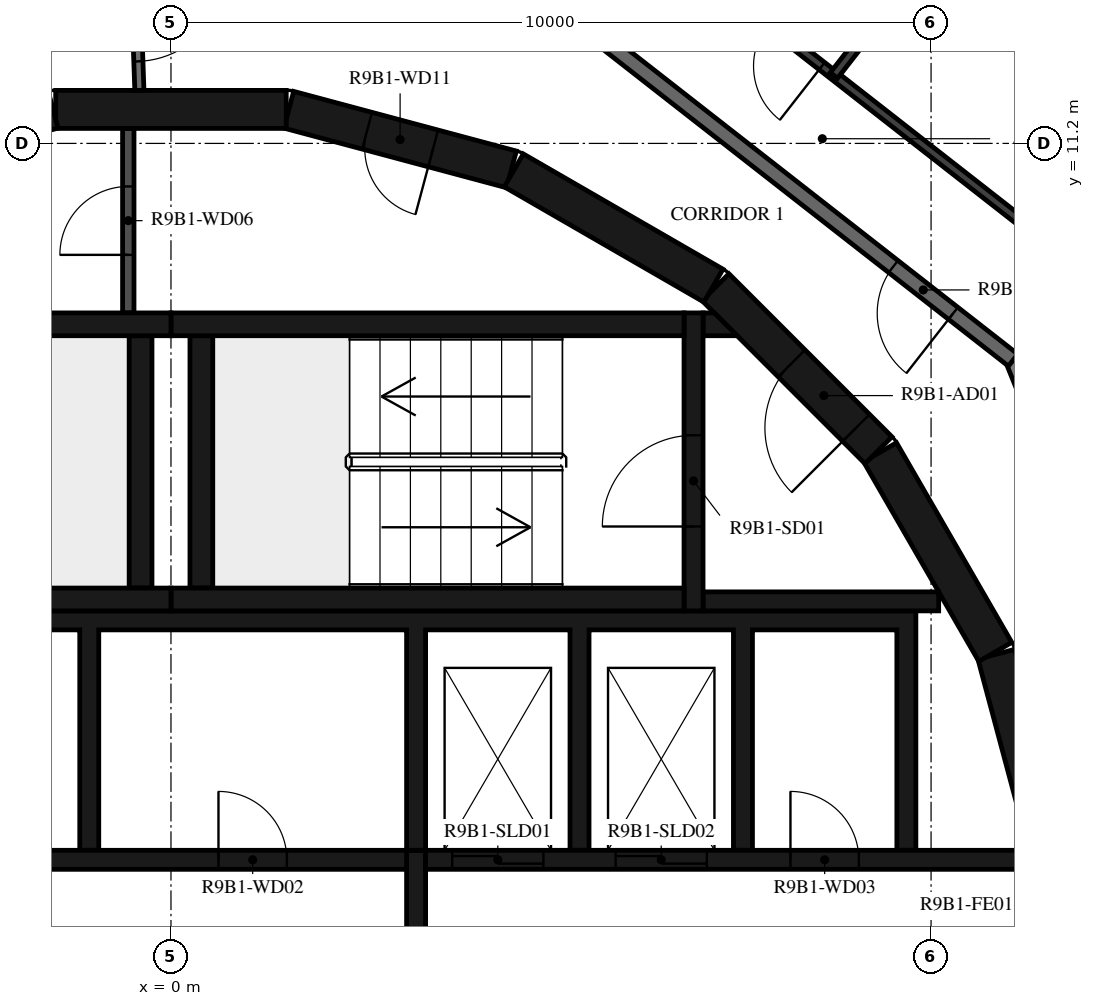
"""IFC4 building model, lengths in metres.
Left out: names, types, materials, properties, quantities, classifications, styles, units other than length and angle.
Written with IfcOpenShell. Run it as: python <this file> out.ifc"""

import sys

from ifc_helpers import new_model, si_unit, direction, frame, frame_2d, origin, place, context, subcontext, project, spatial, polyline, rectangle, outline, extrude, element, fill, save


model = new_model("IFC4")
c1 = context("Model", 3, precision=1e-05, world=origin(), true_north=direction((0.0, 1.0)))
c2 = subcontext(c1, "Body", "Model", "MODEL_VIEW")
j1 = project(units=[si_unit("LENGTHUNIT", "METRE"), si_unit("PLANEANGLEUNIT", "RADIAN")], contexts=[c1])
p1 = place(None, origin())
s1 = spatial("IfcSite", under=j1, at=p1, CompositionType="ELEMENT")
p2 = place(p1, origin())
s2 = spatial("IfcBuilding", under=s1, at=p2, CompositionType="ELEMENT")
p3 = place(p2, frame((0.0, 0.0, 343.5)))
s3 = spatial("IfcBuildingStorey", under=s2, at=p3, CompositionType="ELEMENT", Elevation=343.5)
for number, where, z_axis, x_axis in (
    (1, (11.643, 1.55, 0.0), (0.0, 0.0, 1.0), (-0.259, 0.966, 0.0)),
    (2, (10.845, 4.51, 0.0), (0.0, 0.0, 1.0), (-0.5, 0.866, 0.0)),
):
    element("IfcWall", number, at=place(p3, frame(where, z_axis=z_axis, x_axis=x_axis)), inside=s3, PredefinedType="SHEAR", context=c2, shape_type="SweptSolid", body=[
        extrude(rectangle(XDim=3.033, YDim=0.5, at=frame_2d((1.516, 0.0))), origin(), (0.0, 0.0, 1.0), 3.12),
    ])
p4 = place(p3, frame((9.308, 7.164, 0.0), z_axis=(0.0, 0.0, 1.0), x_axis=(-0.707106781187, 0.707106781187, 0.0)))
e3 = element("IfcWall", 3, at=p4, inside=s3, PredefinedType="SHEAR", context=c2, shape_type="SweptSolid", body=[
    extrude(rectangle(XDim=3.032, YDim=0.5, at=frame_2d((1.516, 0.0))), origin(), (0.0, 0.0, 1.0), 3.12),
])
p5 = place(p4, frame((0.416, 0.0, 0.0)))
e4 = element("IfcOpeningElement", 4, at=p5, cuts=e3, PredefinedType="OPENING", context=c2, shape_type="SweptSolid", body=[
    extrude(rectangle(XDim=1.2, YDim=2.1, at=frame_2d((0.6, 1.05))), frame((0.0, 0.26, 0.0), z_axis=(0.0, -1.0, 0.0), x_axis=(1.0, 0.0, 0.0)), (0.0, 0.0, 1.0), 0.52),
])
p6 = place(p3, frame((7.137, 9.329, 0.0), z_axis=(0.0, 0.0, 1.0), x_axis=(-0.865975092491, 0.500087131594, 0.0)))
e5 = element("IfcWall", 5, at=p6, inside=s3, PredefinedType="SHEAR", context=c2, shape_type="SweptSolid", body=[
    extrude(rectangle(XDim=3.033, YDim=0.5, at=frame_2d((1.516, 0.0))), origin(), (0.0, 0.0, 1.0), 3.12),
])
p7 = place(p3, frame((4.479, 10.858, 0.0), z_axis=(0.0, 0.0, 1.0), x_axis=(-0.965948410781, 0.258734743916, 0.0)))
e6 = element("IfcWall", 6, at=p7, inside=s3, PredefinedType="SHEAR", context=c2, shape_type="SweptSolid", body=[
    extrude(rectangle(XDim=3.033, YDim=0.5, at=frame_2d((1.516, 0.0))), origin(), (0.0, 0.0, 1.0), 3.12),
])
p8 = place(p7, frame((1.066, 0.0, 0.0)))
e7 = element("IfcOpeningElement", 7, at=p8, cuts=e6, PredefinedType="OPENING", context=c2, shape_type="SweptSolid", body=[
    extrude(rectangle(XDim=0.9, YDim=2.1, at=frame_2d((0.45, 1.05))), frame((0.0, 0.26, 0.0), z_axis=(0.0, -1.0, 0.0), x_axis=(1.0, 0.0, 0.0)), (0.0, 0.0, 1.0), 0.52),
])
for number, where, z_axis, x_axis in (
    (8, (1.516, 11.647, 0.0), (0.0, 0.0, 1.0), (-1.0, 0.0, 0.0)),
    (9, (-1.55, 11.643, 0.0), (0.0, 0.0, 1.0), (-0.966, -0.259, 0.0)),
):
    element("IfcWall", number, at=place(p3, frame(where, z_axis=z_axis, x_axis=x_axis)), inside=s3, PredefinedType="SHEAR", context=c2, shape_type="SweptSolid", body=[
        extrude(rectangle(XDim=3.033, YDim=0.5, at=frame_2d((1.516, 0.0))), origin(), (0.0, 0.0, 1.0), 3.12),
    ])
for number, where, z_axis, x_axis in (
    (10, (0.0, 5.2, 0.0), (0.0, 0.0, 1.0), (1.0, 0.0, 0.0)),
    (11, (0.0, 8.82, 0.0), (0.0, 0.0, 1.0), (1.0, 0.0, 0.0)),
):
    element("IfcWall", number, at=place(p3, frame(where, z_axis=z_axis, x_axis=x_axis)), inside=s3, PredefinedType="SHEAR", context=c2, shape_type="SweptSolid", body=[
        extrude(rectangle(XDim=6.75, YDim=0.3, at=frame_2d((3.375, 0.0))), origin(), (0.0, 0.0, 1.0), 3.12),
    ])
p9 = place(p3, frame((0.4, 5.35, 0.0), z_axis=(0.0, 0.0, 1.0), x_axis=(0.0, 1.0, 0.0)))
e12 = element("IfcWall", 12, at=p9, inside=s3, PredefinedType="SHEAR", context=c2, shape_type="SweptSolid", body=[
    extrude(rectangle(XDim=3.32, YDim=0.3, at=frame_2d((1.66, 0.0))), origin(), (0.0, 0.0, 1.0), 3.12),
])
p10 = place(p3, frame((6.875, 5.05, 0.0), z_axis=(0.0, 0.0, 1.0), x_axis=(0.0, 1.0, 0.0)))
e13 = element("IfcWall", 13, at=p10, inside=s3, PredefinedType="SHEAR", context=c2, shape_type="SweptSolid", body=[
    extrude(rectangle(XDim=3.92, YDim=0.25, at=frame_2d((1.96, 0.0))), origin(), (0.0, 0.0, 1.0), 3.12),
])
p11 = place(p10, frame((1.11, 0.0, 0.0)))
e14 = element("IfcOpeningElement", 14, at=p11, cuts=e13, PredefinedType="OPENING", context=c2, shape_type="SweptSolid", body=[
    extrude(rectangle(XDim=1.2, YDim=2.1, at=frame_2d((0.6, 1.05))), frame((0.0, 0.135, 0.0), z_axis=(0.0, -1.0, 0.0), x_axis=(1.0, 0.0, 0.0)), (0.0, 0.0, 1.0), 0.27),
])
p12 = place(p3, frame((7.0, 5.175, 0.0), z_axis=(0.0, 0.0, 1.0), x_axis=(1.0, 0.0, 0.0)))
e15 = element("IfcWall", 15, at=p12, inside=s3, PredefinedType="SHEAR", context=c2, shape_type="SweptSolid", body=[
    extrude(rectangle(XDim=3.1, YDim=0.25, at=frame_2d((1.55, 0.0))), origin(), (0.0, 0.0, 1.0), 3.12),
])
p13 = place(p3, origin())
e16 = element("IfcWall", 16, at=p13, inside=s3, PredefinedType="SHEAR", context=c2, shape_type="SweptSolid", body=[
    extrude(outline(polyline([(7.448, 8.67), (7.0, 8.67), (7.0, 8.97), (7.148, 8.97), (7.448, 8.67)])), origin(), (0.0, 0.0, 1.0), 3.12),
])
for number, where, z_axis, x_axis in (
    (17, (-6.75, 5.2, 0.0), (0.0, 0.0, 1.0), (1.0, 0.0, 0.0)),
    (18, (-6.75, 8.82, 0.0), (0.0, 0.0, 1.0), (1.0, 0.0, 0.0)),
):
    element("IfcWall", number, at=place(p3, frame(where, z_axis=z_axis, x_axis=x_axis)), inside=s3, PredefinedType="SHEAR", context=c2, shape_type="SweptSolid", body=[
        extrude(rectangle(XDim=6.75, YDim=0.3, at=frame_2d((3.375, 0.0))), origin(), (0.0, 0.0, 1.0), 3.12),
    ])
p14 = place(p3, frame((-0.4, 5.35, 0.0), z_axis=(0.0, 0.0, 1.0), x_axis=(0.0, 1.0, 0.0)))
e19 = element("IfcWall", 19, at=p14, inside=s3, PredefinedType="SHEAR", context=c2, shape_type="SweptSolid", body=[
    extrude(rectangle(XDim=3.32, YDim=0.3, at=frame_2d((1.66, 0.0))), origin(), (0.0, 0.0, 1.0), 3.12),
])
p15 = place(p3, origin())
e20 = element("IfcWall", 20, at=p15, inside=s3, PredefinedType="SHEAR", context=c2, shape_type="SweptSolid", body=[
    extrude(outline(polyline([(-9.8, 1.9), (-9.55, 1.9), (-9.55, 4.8), (-1.2, 4.8), (-1.2, 1.9), (-0.95, 1.9), (-0.95, 4.8), (3.1, 4.8), (3.1, 1.9), (3.35, 1.9), (3.35, 4.8), (5.25, 4.8), (5.25, 1.9), (5.5, 1.9), (5.5, 4.8), (7.4, 4.8), (7.4, 1.9), (7.65, 1.9), (7.65, 4.8), (9.55, 4.8), (9.55, 1.9), (9.8, 1.9), (9.8, 4.8), (9.8, 5.05), (-9.8, 5.05), (-9.8, 4.8), (-9.8, 1.9)])), origin(), (0.0, 0.0, 1.0), 3.12),
])
p16 = place(p3, frame((-11.28, 1.775, 0.0), z_axis=(0.0, 0.0, 1.0), x_axis=(1.0, 0.0, 0.0)))
e21 = element("IfcWall", 21, at=p16, inside=s3, PredefinedType="SHEAR", context=c2, shape_type="SweptSolid", body=[
    extrude(rectangle(XDim=14.38, YDim=0.25, at=frame_2d((7.19, 0.0))), origin(), (0.0, 0.0, 1.0), 3.12),
])
p17 = place(p16, frame((5.455, 0.0, 0.0)))
e22 = element("IfcOpeningElement", 22, at=p17, cuts=e21, PredefinedType="OPENING", context=c2, shape_type="SweptSolid", body=[
    extrude(rectangle(XDim=0.9, YDim=2.1, at=frame_2d((0.45, 1.05))), frame((0.0, 0.135, 0.0), z_axis=(0.0, -1.0, 0.0), x_axis=(1.0, 0.0, 0.0)), (0.0, 0.0, 1.0), 0.27),
])
p18 = place(p16, frame((11.905, 0.0, 0.0)))
e23 = element("IfcOpeningElement", 23, at=p18, cuts=e21, PredefinedType="OPENING", context=c2, shape_type="SweptSolid", body=[
    extrude(rectangle(XDim=0.9, YDim=2.1, at=frame_2d((0.45, 1.05))), frame((0.0, 0.135, 0.0), z_axis=(0.0, -1.0, 0.0), x_axis=(1.0, 0.0, 0.0)), (0.0, 0.0, 1.0), 0.27),
])
p19 = place(p3, frame((3.35, 1.775, 0.0), z_axis=(0.0, 0.0, 1.0), x_axis=(1.0, 0.0, 0.0)))
e24 = element("IfcWall", 24, at=p19, inside=s3, PredefinedType="SHEAR", context=c2, shape_type="SweptSolid", body=[
    extrude(rectangle(XDim=7.93, YDim=0.25, at=frame_2d((3.965, 0.0))), origin(), (0.0, 0.0, 1.0), 3.12),
])
p20 = place(p19, frame((0.35, 0.0, 0.0)))
e25 = element("IfcOpeningElement", 25, at=p20, cuts=e24, PredefinedType="OPENING", context=c2, shape_type="SweptSolid", body=[
    extrude(rectangle(XDim=1.2, YDim=2.4, at=frame_2d((0.6, 1.2))), frame((0.0, 0.135, 0.0), z_axis=(0.0, -1.0, 0.0), x_axis=(1.0, 0.0, 0.0)), (0.0, 0.0, 1.0), 0.27),
])
p21 = place(p19, frame((2.5, 0.0, 0.0)))
e26 = element("IfcOpeningElement", 26, at=p21, cuts=e24, PredefinedType="OPENING", context=c2, shape_type="SweptSolid", body=[
    extrude(rectangle(XDim=1.2, YDim=2.4, at=frame_2d((0.6, 1.2))), frame((0.0, 0.135, 0.0), z_axis=(0.0, -1.0, 0.0), x_axis=(1.0, 0.0, 0.0)), (0.0, 0.0, 1.0), 0.27),
])
p22 = place(p19, frame((4.8, 0.0, 0.0)))
e27 = element("IfcOpeningElement", 27, at=p22, cuts=e24, PredefinedType="OPENING", context=c2, shape_type="SweptSolid", body=[
    extrude(rectangle(XDim=0.9, YDim=2.1, at=frame_2d((0.45, 1.05))), frame((0.0, 0.135, 0.0), z_axis=(0.0, -1.0, 0.0), x_axis=(1.0, 0.0, 0.0)), (0.0, 0.0, 1.0), 0.27),
])
p23 = place(p3, frame((3.225, -1.9, 0.0), z_axis=(0.0, 0.0, 1.0), x_axis=(0.0, 1.0, 0.0)))
e28 = element("IfcWall", 28, at=p23, inside=s3, PredefinedType="SHEAR", context=c2, shape_type="SweptSolid", body=[
    extrude(rectangle(XDim=3.8, YDim=0.25, at=frame_2d((1.9, 0.0))), origin(), (0.0, 0.0, 1.0), 3.12),
])
p24 = place(p3, frame((-0.562, 8.97, 0.0), z_axis=(0.0, 0.0, 1.0), x_axis=(0.0, 1.0, 0.0)))
e29 = element("IfcWall", 29, at=p24, inside=s3, PredefinedType="PARTITIONING", context=c2, shape_type="SweptSolid", body=[
    extrude(rectangle(XDim=2.427, YDim=0.15, at=frame_2d((1.214, 0.0))), origin(), (0.0, 0.0, 1.0), 3.12),
])
p25 = place(p24, frame((0.764, 0.0, 0.0)))
e30 = element("IfcOpeningElement", 30, at=p25, cuts=e29, PredefinedType="OPENING", context=c2, shape_type="SweptSolid", body=[
    extrude(rectangle(XDim=0.9, YDim=2.1, at=frame_2d((0.45, 1.05))), frame((0.0, 0.085, 0.0), z_axis=(0.0, -1.0, 0.0), x_axis=(1.0, 0.0, 0.0)), (0.0, 0.0, 1.0), 0.17),
])
p26 = place(p3, frame((-0.475, 13.598, 0.0), z_axis=(0.0, 0.0, 1.0), x_axis=(0.034852521429, -0.999392466326, 0.0)))
e31 = element("IfcWall", 31, at=p26, inside=s3, PredefinedType="PARTITIONING", context=c2, shape_type="SweptSolid", body=[
    extrude(rectangle(XDim=1.702, YDim=0.12, at=frame_2d((0.851, 0.0))), origin(), (0.0, 0.0, 1.0), 3.12),
])
p27 = place(p26, frame((0.12, 0.0, 0.0)))
e32 = element("IfcOpeningElement", 32, at=p27, cuts=e31, PredefinedType="OPENING", context=c2, shape_type="SweptSolid", body=[
    extrude(rectangle(XDim=1.2, YDim=2.1, at=frame_2d((0.6, 1.05))), frame((0.0, 0.07, 0.0), z_axis=(0.0, -1.0, 0.0), x_axis=(1.0, 0.0, 0.0)), (0.0, 0.0, 1.0), 0.14),
])
p28 = place(p3, frame((13.769, 1.691, 0.0), z_axis=(0.0, 0.0, 1.0), x_axis=(-0.374618189599, 0.92717916932, 0.0)))
e33 = element("IfcWall", 33, at=p28, inside=s3, PredefinedType="STANDARD", context=c2, shape_type="SweptSolid", body=[
    extrude(rectangle(XDim=7.181, YDim=0.2, at=frame_2d((3.591, 0.0))), origin(), (0.0, 0.0, 1.0), 3.12),
])
p29 = place(p28, frame((2.371, 0.0, 0.0)))
e34 = element("IfcOpeningElement", 34, at=p29, cuts=e33, PredefinedType="OPENING", context=c2, shape_type="SweptSolid", body=[
    extrude(rectangle(XDim=1.0, YDim=2.1, at=frame_2d((0.5, 1.05))), frame((0.0, 0.11, 0.0), z_axis=(0.0, -1.0, 0.0), x_axis=(1.0, 0.0, 0.0)), (0.0, 0.0, 1.0), 0.22),
])
p30 = place(p3, frame((11.079, 8.349, 0.0), z_axis=(0.0, 0.0, 1.0), x_axis=(-0.78800478687, 0.615669112324, 0.0)))
e35 = element("IfcWall", 35, at=p30, inside=s3, PredefinedType="STANDARD", context=c2, shape_type="SweptSolid", body=[
    extrude(rectangle(XDim=7.181, YDim=0.2, at=frame_2d((3.591, 0.0))), origin(), (0.0, 0.0, 1.0), 3.12),
])
p31 = place(p30, frame((1.0, 0.0, 0.0)))
e36 = element("IfcOpeningElement", 36, at=p31, cuts=e35, PredefinedType="OPENING", context=c2, shape_type="SweptSolid", body=[
    extrude(rectangle(XDim=1.0, YDim=2.1, at=frame_2d((0.5, 1.05))), frame((0.0, 0.11, 0.0), z_axis=(0.0, -1.0, 0.0), x_axis=(1.0, 0.0, 0.0)), (0.0, 0.0, 1.0), 0.22),
])
p32 = place(p3, frame((12.319, 9.283, 0.0), z_axis=(0.0, 0.0, 1.0), x_axis=(-0.788000268464, 0.61567489546, 0.0)))
e37 = element("IfcWall", 37, at=p32, inside=s3, PredefinedType="PARTITIONING", context=c2, shape_type="SweptSolid", body=[
    extrude(rectangle(XDim=7.985, YDim=0.12, at=frame_2d((3.992, 0.0))), origin(), (0.0, 0.0, 1.0), 3.12),
])
p33 = place(p32, frame((4.765, 0.0, 0.0)))
e38 = element("IfcOpeningElement", 38, at=p33, cuts=e37, PredefinedType="OPENING", context=c2, shape_type="SweptSolid", body=[
    extrude(rectangle(XDim=0.9, YDim=2.1, at=frame_2d((0.45, 1.05))), frame((0.0, 0.07, 0.0), z_axis=(0.0, -1.0, 0.0), x_axis=(1.0, 0.0, 0.0)), (0.0, 0.0, 1.0), 0.14),
])
p34 = place(p3, frame((11.315, 15.414, 0.0), z_axis=(0.0, 0.0, 1.0), x_axis=(-0.615656413137, -0.788014708596, 0.0)))
e39 = element("IfcWall", 39, at=p34, inside=s3, PredefinedType="PARTITIONING", context=c2, shape_type="SweptSolid", body=[
    extrude(rectangle(XDim=4.213, YDim=0.12, at=frame_2d((2.106, 0.0))), origin(), (0.0, 0.0, 1.0), 3.12),
])
p35 = place(p11, origin())
e40 = element("IfcDoor", 40, at=p35, inside=s3, OperationType="SINGLE_SWING_LEFT", PredefinedType="DOOR", context=c2, shape_type="SweptSolid", body=[
    extrude(rectangle(XDim=1.2, YDim=2.1, at=frame_2d((0.6, 1.05))), frame((0.0, 0.025, 0.0), z_axis=(0.0, -1.0, 0.0), x_axis=(1.0, 0.0, 0.0)), (0.0, 0.0, 1.0), 0.05),
])
fill(e14, e40)
p36 = place(p5, origin())
e41 = element("IfcDoor", 41, at=p36, inside=s3, OperationType="SINGLE_SWING_RIGHT", PredefinedType="DOOR", context=c2, shape_type="SweptSolid", body=[
    extrude(rectangle(XDim=1.2, YDim=2.1, at=frame_2d((0.6, 1.05))), frame((0.0, 0.025, 0.0), z_axis=(0.0, -1.0, 0.0), x_axis=(1.0, 0.0, 0.0)), (0.0, 0.0, 1.0), 0.05),
])
fill(e4, e41)
p37 = place(p20, origin())
e42 = element("IfcDoor", 42, at=p37, inside=s3, OperationType="DOUBLE_DOOR_SLIDING", PredefinedType="DOOR", context=c2, shape_type="SweptSolid", body=[
    extrude(rectangle(XDim=1.2, YDim=2.4, at=frame_2d((0.6, 1.2))), frame((0.0, 0.025, 0.0), z_axis=(0.0, -1.0, 0.0), x_axis=(1.0, 0.0, 0.0)), (0.0, 0.0, 1.0), 0.05),
])
fill(e25, e42)
p38 = place(p21, origin())
e43 = element("IfcDoor", 43, at=p38, inside=s3, OperationType="DOUBLE_DOOR_SLIDING", PredefinedType="DOOR", context=c2, shape_type="SweptSolid", body=[
    extrude(rectangle(XDim=1.2, YDim=2.4, at=frame_2d((0.6, 1.2))), frame((0.0, 0.025, 0.0), z_axis=(0.0, -1.0, 0.0), x_axis=(1.0, 0.0, 0.0)), (0.0, 0.0, 1.0), 0.05),
])
fill(e26, e43)
p39 = place(p18, origin())
e44 = element("IfcDoor", 44, at=p39, inside=s3, OperationType="SINGLE_SWING_RIGHT", PredefinedType="DOOR", context=c2, shape_type="SweptSolid", body=[
    extrude(rectangle(XDim=0.9, YDim=2.1, at=frame_2d((0.45, 1.05))), frame((0.0, 0.025, 0.0), z_axis=(0.0, -1.0, 0.0), x_axis=(1.0, 0.0, 0.0)), (0.0, 0.0, 1.0), 0.05),
])
fill(e23, e44)
p40 = place(p22, origin())
e45 = element("IfcDoor", 45, at=p40, inside=s3, OperationType="SINGLE_SWING_LEFT", PredefinedType="DOOR", context=c2, shape_type="SweptSolid", body=[
    extrude(rectangle(XDim=0.9, YDim=2.1, at=frame_2d((0.45, 1.05))), frame((0.0, 0.025, 0.0), z_axis=(0.0, -1.0, 0.0), x_axis=(1.0, 0.0, 0.0)), (0.0, 0.0, 1.0), 0.05),
])
fill(e27, e45)
p41 = place(p25, origin())
e46 = element("IfcDoor", 46, at=p41, inside=s3, OperationType="SINGLE_SWING_RIGHT", PredefinedType="DOOR", context=c2, shape_type="SweptSolid", body=[
    extrude(rectangle(XDim=0.9, YDim=2.1, at=frame_2d((0.45, 1.05))), frame((0.0, 0.025, 0.0), z_axis=(0.0, -1.0, 0.0), x_axis=(1.0, 0.0, 0.0)), (0.0, 0.0, 1.0), 0.05),
])
fill(e30, e46)
p42 = place(p8, origin())
e47 = element("IfcDoor", 47, at=p42, inside=s3, OperationType="SINGLE_SWING_LEFT", PredefinedType="DOOR", context=c2, shape_type="SweptSolid", body=[
    extrude(rectangle(XDim=0.9, YDim=2.1, at=frame_2d((0.45, 1.05))), frame((0.0, 0.025, 0.0), z_axis=(0.0, -1.0, 0.0), x_axis=(1.0, 0.0, 0.0)), (0.0, 0.0, 1.0), 0.05),
])
fill(e7, e47)
p43 = place(p31, origin())
e48 = element("IfcDoor", 48, at=p43, inside=s3, OperationType="SINGLE_SWING_LEFT", PredefinedType="DOOR", context=c2, shape_type="SweptSolid", body=[
    extrude(rectangle(XDim=1.0, YDim=2.1, at=frame_2d((0.5, 1.05))), frame((0.0, 0.025, 0.0), z_axis=(0.0, -1.0, 0.0), x_axis=(1.0, 0.0, 0.0)), (0.0, 0.0, 1.0), 0.05),
])
fill(e36, e48)
p44 = place(p33, origin())
e49 = element("IfcDoor", 49, at=p44, inside=s3, OperationType="SINGLE_SWING_LEFT", PredefinedType="DOOR", context=c2, shape_type="SweptSolid", body=[
    extrude(rectangle(XDim=0.9, YDim=2.1, at=frame_2d((0.45, 1.05))), frame((0.0, 0.025, 0.0), z_axis=(0.0, -1.0, 0.0), x_axis=(1.0, 0.0, 0.0)), (0.0, 0.0, 1.0), 0.05),
])
fill(e38, e49)
p45 = place(p27, origin())
e50 = element("IfcDoor", 50, at=p45, inside=s3, OperationType="DOUBLE_DOOR_SINGLE_SWING", PredefinedType="DOOR", context=c2, shape_type="SweptSolid", body=[
    extrude(rectangle(XDim=1.2, YDim=2.1, at=frame_2d((0.6, 1.05))), frame((0.0, 0.025, 0.0), z_axis=(0.0, -1.0, 0.0), x_axis=(1.0, 0.0, 0.0)), (0.0, 0.0, 1.0), 0.05),
])
fill(e32, e50)
save(model, sys.argv[1])
